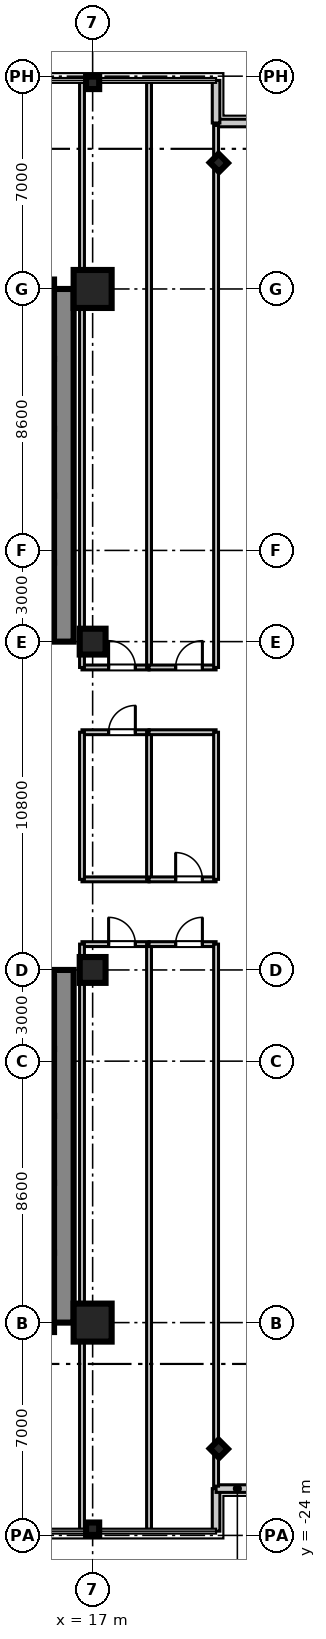
"""IFC4 building model, lengths in metres.
Left out: names, types, materials, properties, quantities, classifications, styles, units other than length and angle.
Written with IfcOpenShell. Run it as: python <this file> out.ifc"""

import sys

from ifc_helpers import new_model, si_unit, direction, frame, frame_2d, origin, origin_2d, place, context, subcontext, project, spatial, rectangle, i_section, extrude, source, transform, mapped, element, fill, save


model = new_model("IFC4")
c1 = context("Model", 3, precision=1e-05, world=origin(), true_north=direction((0.0, 1.0)))
c2 = subcontext(c1, "Body", "Model", "MODEL_VIEW")
j1 = project(units=[si_unit("LENGTHUNIT", "METRE"), si_unit("PLANEANGLEUNIT", "RADIAN")], contexts=[c1])
p1 = place(None, origin())
s1 = spatial("IfcSite", under=j1, at=p1, CompositionType="ELEMENT")
p2 = place(p1, origin())
s2 = spatial("IfcBuilding", under=s1, at=p2, CompositionType="ELEMENT")
p3 = place(p2, frame((0.0, 0.0, 132.1)))
s3 = spatial("IfcBuildingStorey", under=s2, at=p3, CompositionType="ELEMENT", Elevation=132.1)
m1 = source(origin(), c2, "Body", "SweptSolid", [
    extrude(rectangle(XDim=1.25, YDim=1.25, at=origin_2d()), origin(), (0.0, 0.0, 1.0), 3.605),
])
p4 = place(p3, frame((17.0, -17.0, 0.0), z_axis=(0.0, 0.0, 1.0), x_axis=(1.0, 0.0, 0.0)))
e1 = element("IfcColumn", 1, at=p4, inside=s3, PredefinedType="COLUMN", context=c2, shape_type="MappedRepresentation", body=[
    mapped(m1, transform((0.0, 0.0, 0.0), scale=1.0)),
])
m2 = source(origin(), c2, "Body", "SweptSolid", [
    extrude(rectangle(XDim=0.85, YDim=0.85, at=origin_2d()), origin(), (0.0, 0.0, 1.0), 3.605),
])
for number, where, z_axis, x_axis in (
    (2, (17.0, -5.4, 0.0), (0.0, 0.0, 1.0), (1.0, 0.0, 0.0)),
    (3, (17.0, 5.4, 0.0), (0.0, 0.0, 1.0), (1.0, 0.0, 0.0)),
):
    element("IfcColumn", number, at=place(p3, frame(where, z_axis=z_axis, x_axis=x_axis)), inside=s3, PredefinedType="PILASTER", context=c2, shape_type="MappedRepresentation", body=[
        mapped(m2, transform((0.0, 0.0, 0.0), scale=1.0)),
    ])
p5 = place(p3, frame((17.0, 17.0, 0.0), z_axis=(0.0, 0.0, 1.0), x_axis=(1.0, 0.0, 0.0)))
e4 = element("IfcColumn", 4, at=p5, inside=s3, PredefinedType="COLUMN", context=c2, shape_type="MappedRepresentation", body=[
    mapped(m1, transform((0.0, 0.0, 0.0), scale=1.0)),
])
m3 = source(origin(), c2, "Body", "SweptSolid", [
    extrude(i_section(OverallWidth=0.409, OverallDepth=0.43, WebThickness=0.021, FlangeThickness=0.034, at=origin_2d()), origin(), (0.0, 0.0, 1.0), 3.605),
])
for number, where, z_axis, x_axis in (
    (5, (17.0, -23.78, 0.0), (0.0, 0.0, 1.0), (0.0, 1.0, 0.0)),
    (6, (17.0, 23.78, 0.0), (0.0, 0.0, 1.0), (0.0, 1.0, 0.0)),
    (7, (21.15, -21.15, 0.0), (0.0, 0.0, 1.0), (0.707, 0.707, 0.0)),
    (8, (21.15, 21.15, 0.0), (0.0, 0.0, 1.0), (0.707, 0.707, 0.0)),
):
    element("IfcColumn", number, at=place(p3, frame(where, z_axis=z_axis, x_axis=x_axis)), inside=s3, PredefinedType="COLUMN", context=c2, shape_type="MappedRepresentation", body=[
        mapped(m3, transform((0.0, 0.0, 0.0), scale=1.0)),
    ])
m4 = source(origin(), c2, "Body", "SweptSolid", [
    extrude(rectangle(XDim=11.6, YDim=0.65, at=frame_2d((5.8, 0.0))), origin(), (0.0, 0.0, 1.0), 3.38),
])
for number, where, z_axis, x_axis in (
    (9, (16.05, 5.4, 0.0), (0.0, 0.0, 1.0), (0.0, 1.0, 0.0)),
    (10, (16.05, -17.0, 0.0), (0.0, 0.0, 1.0), (0.0, 1.0, 0.0)),
):
    element("IfcWall", number, at=place(p3, frame(where, z_axis=z_axis, x_axis=x_axis)), inside=s3, PredefinedType="SHEAR", context=c2, shape_type="MappedRepresentation", body=[
        mapped(m4, transform((0.0, 0.0, 0.0), scale=1.0)),
    ])
m5 = source(origin(), c2, "Body", "SweptSolid", [
    extrude(rectangle(XDim=2.36, YDim=0.22, at=frame_2d((1.18, 0.0))), origin(), (0.0, 0.0, 1.0), 3.38),
])
p6 = place(p3, frame((15.62, 5.64, 0.0), z_axis=(0.0, 0.0, 1.0), x_axis=(0.0, 1.0, 0.0)))
e11 = element("IfcWall", 11, at=p6, inside=s3, PredefinedType="SHEAR", context=c2, shape_type="MappedRepresentation", body=[
    mapped(m5, transform((0.0, 0.0, 0.0), scale=1.0)),
])
m6 = source(origin(), c2, "Body", "SweptSolid", [
    extrude(rectangle(XDim=2.2, YDim=0.22, at=frame_2d((1.1, 0.0))), origin(), (0.0, 0.0, 1.0), 3.38),
])
for number, where, z_axis, x_axis in (
    (12, (15.62, 8.0, 0.0), (0.0, 0.0, 1.0), (0.0, 1.0, 0.0)),
    (13, (15.62, 10.2, 0.0), (0.0, 0.0, 1.0), (0.0, 1.0, 0.0)),
):
    element("IfcWall", number, at=place(p3, frame(where, z_axis=z_axis, x_axis=x_axis)), inside=s3, PredefinedType="SHEAR", context=c2, shape_type="MappedRepresentation", body=[
        mapped(m6, transform((0.0, 0.0, 0.0), scale=1.0)),
    ])
m7 = source(origin(), c2, "Body", "SweptSolid", [
    extrude(rectangle(XDim=2.3, YDim=0.22, at=frame_2d((1.15, 0.0))), origin(), (0.0, 0.0, 1.0), 3.38),
])
p7 = place(p3, frame((15.62, 12.4, 0.0), z_axis=(0.0, 0.0, 1.0), x_axis=(0.0, 1.0, 0.0)))
e14 = element("IfcWall", 14, at=p7, inside=s3, PredefinedType="SHEAR", context=c2, shape_type="MappedRepresentation", body=[
    mapped(m7, transform((0.0, 0.0, 0.0), scale=1.0)),
])
p8 = place(p3, frame((15.62, -8.0, 0.0), z_axis=(0.0, 0.0, 1.0), x_axis=(0.0, 1.0, 0.0)))
e15 = element("IfcWall", 15, at=p8, inside=s3, PredefinedType="SHEAR", context=c2, shape_type="MappedRepresentation", body=[
    mapped(m5, transform((0.0, 0.0, 0.0), scale=1.0)),
])
for number, where, z_axis, x_axis in (
    (16, (15.62, -10.2, 0.0), (0.0, 0.0, 1.0), (0.0, 1.0, 0.0)),
    (17, (15.62, -12.4, 0.0), (0.0, 0.0, 1.0), (0.0, 1.0, 0.0)),
):
    element("IfcWall", number, at=place(p3, frame(where, z_axis=z_axis, x_axis=x_axis)), inside=s3, PredefinedType="SHEAR", context=c2, shape_type="MappedRepresentation", body=[
        mapped(m6, transform((0.0, 0.0, 0.0), scale=1.0)),
    ])
p9 = place(p3, frame((15.62, -14.7, 0.0), z_axis=(0.0, 0.0, 1.0), x_axis=(0.0, 1.0, 0.0)))
e18 = element("IfcWall", 18, at=p9, inside=s3, PredefinedType="SHEAR", context=c2, shape_type="MappedRepresentation", body=[
    mapped(m7, transform((0.0, 0.0, 0.0), scale=1.0)),
])
m8 = source(origin(), c2, "Body", "SweptSolid", [
    extrude(rectangle(XDim=2.61, YDim=0.22, at=frame_2d((1.305, 0.0))), origin(), (0.0, 0.0, 1.0), 3.38),
])
for number, where, z_axis, x_axis in (
    (19, (15.62, 14.7, 0.0), (0.0, 0.0, 1.0), (0.0, 1.0, 0.0)),
    (20, (15.62, -17.31, 0.0), (0.0, 0.0, 1.0), (0.0, 1.0, 0.0)),
):
    element("IfcWall", number, at=place(p3, frame(where, z_axis=z_axis, x_axis=x_axis)), inside=s3, PredefinedType="SHEAR", context=c2, shape_type="MappedRepresentation", body=[
        mapped(m8, transform((0.0, 0.0, 0.0), scale=1.0)),
    ])
m9 = source(origin(), c2, "Body", "SweptSolid", [
    extrude(rectangle(XDim=1.4, YDim=0.25, at=frame_2d((0.7, 0.0))), origin(), (0.0, 0.0, 1.0), 3.38),
])
p10 = place(p3, frame((21.06, -23.86, 0.0), z_axis=(0.0, 0.0, 1.0), x_axis=(0.0, 1.0, 0.0)))
e21 = element("IfcWall", 21, at=p10, inside=s3, PredefinedType="STANDARD", context=c2, shape_type="MappedRepresentation", body=[
    mapped(m9, transform((0.0, 0.0, 0.0), scale=1.0)),
])
m10 = source(origin(), c2, "Body", "SweptSolid", [
    extrude(rectangle(XDim=1.4, YDim=0.25, at=frame_2d((0.7, 0.0))), origin(), (0.0, 0.0, 1.0), 3.38),
])
for number, where, z_axis, x_axis in (
    (22, (21.06, -22.46, 0.0), (0.0, 0.0, 1.0), (1.0, 0.0, 0.0)),
    (23, (21.06, 22.46, 0.0), (0.0, 0.0, 1.0), (1.0, 0.0, 0.0)),
):
    element("IfcWall", number, at=place(p3, frame(where, z_axis=z_axis, x_axis=x_axis)), inside=s3, PredefinedType="STANDARD", context=c2, shape_type="MappedRepresentation", body=[
        mapped(m10, transform((0.0, 0.0, 0.0), scale=1.0)),
    ])
p11 = place(p3, frame((21.06, 22.46, 0.0), z_axis=(0.0, 0.0, 1.0), x_axis=(0.0, 1.0, 0.0)))
e24 = element("IfcWall", 24, at=p11, inside=s3, PredefinedType="STANDARD", context=c2, shape_type="MappedRepresentation", body=[
    mapped(m9, transform((0.0, 0.0, 0.0), scale=1.0)),
])
m11 = source(origin(), c2, "Body", "SweptSolid", [
    extrude(rectangle(XDim=2.205, YDim=0.16, at=frame_2d((1.103, 0.0))), origin(), (0.0, 0.0, 1.0), 2.72),
])
p12 = place(p3, frame((16.65, 4.55, 0.0), z_axis=(0.0, 0.0, 1.0), x_axis=(1.0, 0.0, 0.0)))
e25 = element("IfcWall", 25, at=p12, inside=s3, PredefinedType="PARTITIONING", context=c2, shape_type="MappedRepresentation", body=[
    mapped(m11, transform((0.0, 0.0, 0.0), scale=1.0)),
])
p13 = place(p12, frame((0.875, 0.0, 0.0)))
e26 = element("IfcOpeningElement", 26, at=p13, cuts=e25, PredefinedType="OPENING", context=c2, shape_type="SweptSolid", body=[
    extrude(rectangle(XDim=0.88, YDim=2.1, at=frame_2d((0.44, 1.05))), frame((0.0, 0.09, 0.0), z_axis=(0.0, -1.0, 0.0), x_axis=(1.0, 0.0, 0.0)), (0.0, 0.0, 1.0), 0.18),
])
m12 = source(origin(), c2, "Body", "SweptSolid", [
    extrude(rectangle(XDim=19.25, YDim=0.16, at=frame_2d((9.625, 0.0))), origin(), (0.0, 0.0, 1.0), 2.72),
])
for number, where, z_axis, x_axis in (
    (27, (16.65, 4.55, 0.0), (0.0, 0.0, 1.0), (0.0, 1.0, 0.0)),
    (28, (18.855, 4.55, 0.0), (0.0, 0.0, 1.0), (0.0, 1.0, 0.0)),
):
    element("IfcWall", number, at=place(p3, frame(where, z_axis=z_axis, x_axis=x_axis)), inside=s3, PredefinedType="PARTITIONING", context=c2, shape_type="MappedRepresentation", body=[
        mapped(m12, transform((0.0, 0.0, 0.0), scale=1.0)),
    ])
p14 = place(p3, frame((18.855, 4.55, 0.0), z_axis=(0.0, 0.0, 1.0), x_axis=(1.0, 0.0, 0.0)))
e29 = element("IfcWall", 29, at=p14, inside=s3, PredefinedType="PARTITIONING", context=c2, shape_type="MappedRepresentation", body=[
    mapped(m11, transform((0.0, 0.0, 0.0), scale=1.0)),
])
p15 = place(p14, frame((0.875, 0.0, 0.0)))
e30 = element("IfcOpeningElement", 30, at=p15, cuts=e29, PredefinedType="OPENING", context=c2, shape_type="SweptSolid", body=[
    extrude(rectangle(XDim=0.88, YDim=2.1, at=frame_2d((0.44, 1.05))), frame((0.0, 0.09, 0.0), z_axis=(0.0, -1.0, 0.0), x_axis=(1.0, 0.0, 0.0)), (0.0, 0.0, 1.0), 0.18),
])
m13 = source(origin(), c2, "Body", "SweptSolid", [
    extrude(rectangle(XDim=17.83, YDim=0.16, at=frame_2d((8.915, 0.0))), origin(), (0.0, 0.0, 1.0), 2.72),
])
p16 = place(p3, frame((21.06, 4.55, 0.0), z_axis=(0.0, 0.0, 1.0), x_axis=(0.0, 1.0, 0.0)))
e31 = element("IfcWall", 31, at=p16, inside=s3, PredefinedType="PARTITIONING", context=c2, shape_type="MappedRepresentation", body=[
    mapped(m13, transform((0.0, 0.0, 0.0), scale=1.0)),
])
p17 = place(p3, frame((16.65, -4.55, 0.0), z_axis=(0.0, 0.0, 1.0), x_axis=(1.0, 0.0, 0.0)))
e32 = element("IfcWall", 32, at=p17, inside=s3, PredefinedType="PARTITIONING", context=c2, shape_type="MappedRepresentation", body=[
    mapped(m11, transform((0.0, 0.0, 0.0), scale=1.0)),
])
p18 = place(p17, frame((0.875, 0.0, 0.0)))
e33 = element("IfcOpeningElement", 33, at=p18, cuts=e32, PredefinedType="OPENING", context=c2, shape_type="SweptSolid", body=[
    extrude(rectangle(XDim=0.88, YDim=2.1, at=frame_2d((0.44, 1.05))), frame((0.0, 0.09, 0.0), z_axis=(0.0, -1.0, 0.0), x_axis=(1.0, 0.0, 0.0)), (0.0, 0.0, 1.0), 0.18),
])
for number, where, z_axis, x_axis in (
    (34, (16.65, -23.8, 0.0), (0.0, 0.0, 1.0), (0.0, 1.0, 0.0)),
    (35, (18.855, -23.8, 0.0), (0.0, 0.0, 1.0), (0.0, 1.0, 0.0)),
):
    element("IfcWall", number, at=place(p3, frame(where, z_axis=z_axis, x_axis=x_axis)), inside=s3, PredefinedType="PARTITIONING", context=c2, shape_type="MappedRepresentation", body=[
        mapped(m12, transform((0.0, 0.0, 0.0), scale=1.0)),
    ])
p19 = place(p3, frame((18.855, -4.55, 0.0), z_axis=(0.0, 0.0, 1.0), x_axis=(1.0, 0.0, 0.0)))
e36 = element("IfcWall", 36, at=p19, inside=s3, PredefinedType="PARTITIONING", context=c2, shape_type="MappedRepresentation", body=[
    mapped(m11, transform((0.0, 0.0, 0.0), scale=1.0)),
])
p20 = place(p19, frame((0.875, 0.0, 0.0)))
e37 = element("IfcOpeningElement", 37, at=p20, cuts=e36, PredefinedType="OPENING", context=c2, shape_type="SweptSolid", body=[
    extrude(rectangle(XDim=0.88, YDim=2.1, at=frame_2d((0.44, 1.05))), frame((0.0, 0.09, 0.0), z_axis=(0.0, -1.0, 0.0), x_axis=(1.0, 0.0, 0.0)), (0.0, 0.0, 1.0), 0.18),
])
p21 = place(p3, frame((21.06, -22.38, 0.0), z_axis=(0.0, 0.0, 1.0), x_axis=(0.0, 1.0, 0.0)))
e38 = element("IfcWall", 38, at=p21, inside=s3, PredefinedType="PARTITIONING", context=c2, shape_type="MappedRepresentation", body=[
    mapped(m13, transform((0.0, 0.0, 0.0), scale=1.0)),
])
p22 = place(p3, frame((16.65, -2.42, 0.0), z_axis=(0.0, 0.0, 1.0), x_axis=(1.0, 0.0, 0.0)))
e39 = element("IfcWall", 39, at=p22, inside=s3, PredefinedType="PARTITIONING", context=c2, shape_type="MappedRepresentation", body=[
    mapped(m11, transform((0.0, 0.0, 0.0), scale=1.0)),
])
p23 = place(p3, frame((16.65, 2.42, 0.0), z_axis=(0.0, 0.0, 1.0), x_axis=(1.0, 0.0, 0.0)))
e40 = element("IfcWall", 40, at=p23, inside=s3, PredefinedType="PARTITIONING", context=c2, shape_type="MappedRepresentation", body=[
    mapped(m11, transform((0.0, 0.0, 0.0), scale=1.0)),
])
p24 = place(p23, frame((0.875, 0.0, 0.0)))
e41 = element("IfcOpeningElement", 41, at=p24, cuts=e40, PredefinedType="OPENING", context=c2, shape_type="SweptSolid", body=[
    extrude(rectangle(XDim=0.88, YDim=2.1, at=frame_2d((0.44, 1.05))), frame((0.0, 0.09, 0.0), z_axis=(0.0, -1.0, 0.0), x_axis=(1.0, 0.0, 0.0)), (0.0, 0.0, 1.0), 0.18),
])
m14 = source(origin(), c2, "Body", "SweptSolid", [
    extrude(rectangle(XDim=4.84, YDim=0.16, at=frame_2d((2.42, 0.0))), origin(), (0.0, 0.0, 1.0), 2.72),
])
for number, where, z_axis, x_axis in (
    (42, (16.65, -2.42, 0.0), (0.0, 0.0, 1.0), (0.0, 1.0, 0.0)),
    (43, (18.855, -2.42, 0.0), (0.0, 0.0, 1.0), (0.0, 1.0, 0.0)),
):
    element("IfcWall", number, at=place(p3, frame(where, z_axis=z_axis, x_axis=x_axis)), inside=s3, PredefinedType="PARTITIONING", context=c2, shape_type="MappedRepresentation", body=[
        mapped(m14, transform((0.0, 0.0, 0.0), scale=1.0)),
    ])
p25 = place(p3, frame((18.855, -2.42, 0.0), z_axis=(0.0, 0.0, 1.0), x_axis=(1.0, 0.0, 0.0)))
e44 = element("IfcWall", 44, at=p25, inside=s3, PredefinedType="PARTITIONING", context=c2, shape_type="MappedRepresentation", body=[
    mapped(m11, transform((0.0, 0.0, 0.0), scale=1.0)),
])
p26 = place(p25, frame((0.875, 0.0, 0.0)))
e45 = element("IfcOpeningElement", 45, at=p26, cuts=e44, PredefinedType="OPENING", context=c2, shape_type="SweptSolid", body=[
    extrude(rectangle(XDim=0.88, YDim=2.1, at=frame_2d((0.44, 1.05))), frame((0.0, 0.09, 0.0), z_axis=(0.0, -1.0, 0.0), x_axis=(1.0, 0.0, 0.0)), (0.0, 0.0, 1.0), 0.18),
])
p27 = place(p3, frame((18.855, 2.42, 0.0), z_axis=(0.0, 0.0, 1.0), x_axis=(1.0, 0.0, 0.0)))
e46 = element("IfcWall", 46, at=p27, inside=s3, PredefinedType="PARTITIONING", context=c2, shape_type="MappedRepresentation", body=[
    mapped(m11, transform((0.0, 0.0, 0.0), scale=1.0)),
])
p28 = place(p3, frame((21.06, -2.42, 0.0), z_axis=(0.0, 0.0, 1.0), x_axis=(0.0, 1.0, 0.0)))
e47 = element("IfcWall", 47, at=p28, inside=s3, PredefinedType="PARTITIONING", context=c2, shape_type="MappedRepresentation", body=[
    mapped(m14, transform((0.0, 0.0, 0.0), scale=1.0)),
])
m15 = source(origin(), c2, "Body", "SweptSolid", [
    extrude(rectangle(XDim=0.88, YDim=2.1, at=frame_2d((0.44, 1.05))), frame((0.0, 0.025, 0.0), z_axis=(0.0, -1.0, 0.0), x_axis=(1.0, 0.0, 0.0)), (0.0, 0.0, 1.0), 0.05),
])
p29 = place(p13, origin())
e48 = element("IfcDoor", 48, at=p29, inside=s3, OperationType="SINGLE_SWING_LEFT", PredefinedType="DOOR", context=c2, shape_type="MappedRepresentation", body=[
    mapped(m15, transform((0.0, 0.0, 0.0), scale=1.0)),
])
fill(e26, e48)
p30 = place(p15, origin())
e49 = element("IfcDoor", 49, at=p30, inside=s3, OperationType="SINGLE_SWING_RIGHT", PredefinedType="DOOR", context=c2, shape_type="MappedRepresentation", body=[
    mapped(m15, transform((0.0, 0.0, 0.0), scale=1.0)),
])
fill(e30, e49)
p31 = place(p18, frame((0.88, 0.0, 0.0), z_axis=(0.0, 0.0, 1.0), x_axis=(-1.0, 0.0, 0.0)))
e50 = element("IfcDoor", 50, at=p31, inside=s3, OperationType="SINGLE_SWING_LEFT", PredefinedType="DOOR", context=c2, shape_type="MappedRepresentation", body=[
    mapped(m15, transform((0.0, 0.0, 0.0), scale=1.0)),
])
fill(e33, e50)
p32 = place(p20, frame((0.88, 0.0, 0.0), z_axis=(0.0, 0.0, 1.0), x_axis=(-1.0, 0.0, 0.0)))
e51 = element("IfcDoor", 51, at=p32, inside=s3, OperationType="SINGLE_SWING_RIGHT", PredefinedType="DOOR", context=c2, shape_type="MappedRepresentation", body=[
    mapped(m15, transform((0.0, 0.0, 0.0), scale=1.0)),
])
fill(e37, e51)
p33 = place(p24, frame((0.88, 0.0, 0.0), z_axis=(0.0, 0.0, 1.0), x_axis=(-1.0, 0.0, 0.0)))
e52 = element("IfcDoor", 52, at=p33, inside=s3, OperationType="SINGLE_SWING_RIGHT", PredefinedType="DOOR", context=c2, shape_type="MappedRepresentation", body=[
    mapped(m15, transform((0.0, 0.0, 0.0), scale=1.0)),
])
fill(e41, e52)
p34 = place(p26, origin())
e53 = element("IfcDoor", 53, at=p34, inside=s3, OperationType="SINGLE_SWING_LEFT", PredefinedType="DOOR", context=c2, shape_type="MappedRepresentation", body=[
    mapped(m15, transform((0.0, 0.0, 0.0), scale=1.0)),
])
fill(e45, e53)
save(model, sys.argv[1])
